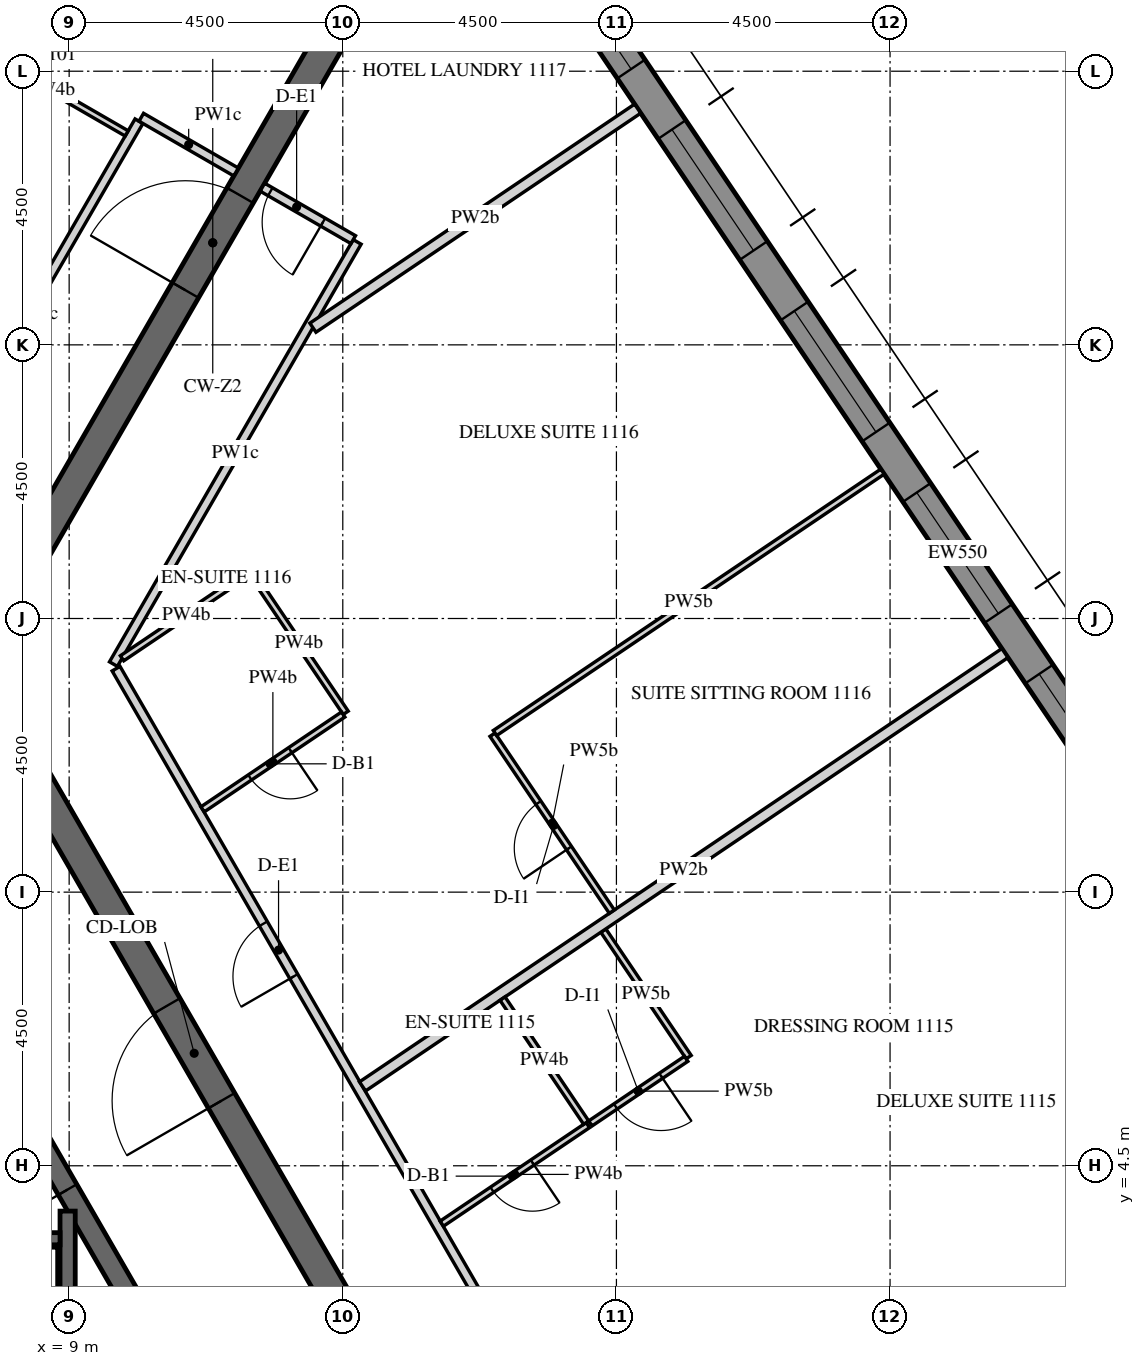
"""IFC4 building model, lengths in metres.
Left out: names, types, materials, properties, quantities, classifications, styles, units other than length and angle.
Written with IfcOpenShell. Run it as: python <this file> out.ifc"""

import sys

from ifc_helpers import new_model, si_unit, direction, frame, frame_2d, origin, place, context, subcontext, project, spatial, polyline, rectangle, outline, extrude, element, fill, save


model = new_model("IFC4")
c1 = context("Model", 3, precision=1e-05, world=origin(), true_north=direction((0.0, 1.0)))
c2 = subcontext(c1, "Body", "Model", "MODEL_VIEW")
j1 = project(units=[si_unit("LENGTHUNIT", "METRE"), si_unit("PLANEANGLEUNIT", "RADIAN")], contexts=[c1])
p1 = place(None, origin())
s1 = spatial("IfcSite", under=j1, at=p1, CompositionType="ELEMENT")
p2 = place(p1, origin())
s2 = spatial("IfcBuilding", under=s1, at=p2, CompositionType="ELEMENT")
p3 = place(p2, frame((0.0, 0.0, 156.6)))
s3 = spatial("IfcBuildingStorey", under=s2, at=p3, CompositionType="ELEMENT", Elevation=156.6)
p4 = place(p3, frame((31.371, 3.071, -0.15), z_axis=(0.0, 0.0, 1.0), x_axis=(-0.559189891278, 0.829039604297, 0.0)))
e1 = element("IfcWall", 1, at=p4, inside=s3, PredefinedType="SOLIDWALL", context=c2, shape_type="SweptSolid", body=[
    extrude(outline(polyline([(-0.026, -0.275), (27.781, -0.275), (27.736, 0.275), (0.026, 0.275), (-0.026, -0.275)])), origin(), (0.0, 0.0, 1.0), 3.9),
])
p5 = place(p4, frame((1.879, 0.0, 1.05)))
e2 = element("IfcOpeningElement", 2, at=p5, cuts=e1, PredefinedType="OPENING", context=c2, shape_type="SweptSolid", body=[
    extrude(rectangle(XDim=2.4, YDim=2.4, at=frame_2d((1.2, 1.2))), frame((0.0, 0.285, 0.0), z_axis=(0.0, -1.0, 0.0), x_axis=(1.0, 0.0, 0.0)), (0.0, 0.0, 1.0), 0.57),
])
p6 = place(p4, frame((5.479, 0.0, 1.05)))
e3 = element("IfcOpeningElement", 3, at=p6, cuts=e1, PredefinedType="OPENING", context=c2, shape_type="SweptSolid", body=[
    extrude(rectangle(XDim=2.4, YDim=2.4, at=frame_2d((1.2, 1.2))), frame((0.0, 0.285, 0.0), z_axis=(0.0, -1.0, 0.0), x_axis=(1.0, 0.0, 0.0)), (0.0, 0.0, 1.0), 0.57),
])
p7 = place(p4, frame((9.079, 0.0, 1.05)))
e4 = element("IfcOpeningElement", 4, at=p7, cuts=e1, PredefinedType="OPENING", context=c2, shape_type="SweptSolid", body=[
    extrude(rectangle(XDim=2.4, YDim=2.4, at=frame_2d((1.2, 1.2))), frame((0.0, 0.285, 0.0), z_axis=(0.0, -1.0, 0.0), x_axis=(1.0, 0.0, 0.0)), (0.0, 0.0, 1.0), 0.57),
])
p8 = place(p4, frame((12.679, 0.0, 1.05)))
e5 = element("IfcOpeningElement", 5, at=p8, cuts=e1, PredefinedType="OPENING", context=c2, shape_type="SweptSolid", body=[
    extrude(rectangle(XDim=2.4, YDim=2.4, at=frame_2d((1.2, 1.2))), frame((0.0, 0.285, 0.0), z_axis=(0.0, -1.0, 0.0), x_axis=(1.0, 0.0, 0.0)), (0.0, 0.0, 1.0), 0.57),
])
p9 = place(p4, frame((16.279, 0.0, 1.05)))
e6 = element("IfcOpeningElement", 6, at=p9, cuts=e1, PredefinedType="OPENING", context=c2, shape_type="SweptSolid", body=[
    extrude(rectangle(XDim=2.4, YDim=2.4, at=frame_2d((1.2, 1.2))), frame((0.0, 0.285, 0.0), z_axis=(0.0, -1.0, 0.0), x_axis=(1.0, 0.0, 0.0)), (0.0, 0.0, 1.0), 0.57),
])
p10 = place(p4, frame((19.879, 0.0, 1.05)))
e7 = element("IfcOpeningElement", 7, at=p10, cuts=e1, PredefinedType="OPENING", context=c2, shape_type="SweptSolid", body=[
    extrude(rectangle(XDim=2.4, YDim=2.4, at=frame_2d((1.2, 1.2))), frame((0.0, 0.285, 0.0), z_axis=(0.0, -1.0, 0.0), x_axis=(1.0, 0.0, 0.0)), (0.0, 0.0, 1.0), 0.57),
])
p11 = place(p4, frame((23.479, 0.0, 1.05)))
e8 = element("IfcOpeningElement", 8, at=p11, cuts=e1, PredefinedType="OPENING", context=c2, shape_type="SweptSolid", body=[
    extrude(rectangle(XDim=2.4, YDim=2.4, at=frame_2d((1.2, 1.2))), frame((0.0, 0.285, 0.0), z_axis=(0.0, -1.0, 0.0), x_axis=(1.0, 0.0, 0.0)), (0.0, 0.0, 1.0), 0.57),
])
p12 = place(p3, frame((14.722, 0.0, -0.15), z_axis=(0.0, 0.0, 1.0), x_axis=(-0.50000571537, 0.866022103989, 0.0)))
e9 = element("IfcWall", 9, at=p12, inside=s3, PredefinedType="SHEAR", context=c2, shape_type="SweptSolid", body=[
    extrude(outline(polyline([(-0.144, -0.25), (14.867, -0.25), (14.578, 0.25), (0.144, 0.25), (-0.144, -0.25)])), origin(), (0.0, 0.0, 1.0), 3.9),
])
p13 = place(p12, frame((6.432, 0.0, 0.15)))
e10 = element("IfcOpeningElement", 10, at=p13, cuts=e9, PredefinedType="OPENING", context=c2, shape_type="SweptSolid", body=[
    extrude(rectangle(XDim=1.8, YDim=2.4, at=frame_2d((0.9, 1.2))), frame((0.0, 0.26, 0.0), z_axis=(0.0, -1.0, 0.0), x_axis=(1.0, 0.0, 0.0)), (0.0, 0.0, 1.0), 0.52),
])
p14 = place(p3, frame((7.506, 13.0, -0.15), z_axis=(0.0, 0.0, 1.0), x_axis=(0.499988271576, 0.866032175087, 0.0)))
e11 = element("IfcWall", 11, at=p14, inside=s3, PredefinedType="SHEAR", context=c2, shape_type="SweptSolid", body=[
    extrude(rectangle(XDim=15.424, YDim=0.5, at=frame_2d((7.712, 0.0))), origin(), (0.0, 0.0, 1.0), 3.9),
])
p15 = place(p14, frame((6.812, 0.0, 0.15)))
e12 = element("IfcOpeningElement", 12, at=p15, cuts=e11, PredefinedType="OPENING", context=c2, shape_type="SweptSolid", body=[
    extrude(rectangle(XDim=1.8, YDim=2.4, at=frame_2d((0.9, 1.2))), frame((0.0, 0.26, 0.0), z_axis=(0.0, -1.0, 0.0), x_axis=(1.0, 0.0, 0.0)), (0.0, 0.0, 1.0), 0.52),
])
p16 = place(p3, frame((11.345, 0.0, -0.15), z_axis=(0.0, 0.0, 1.0), x_axis=(-0.499995046907, 0.866028263435, 0.0)))
e13 = element("IfcWall", 13, at=p16, inside=s3, PredefinedType="SHEAR", context=c2, shape_type="SweptSolid", body=[
    extrude(outline(polyline([(-0.101, -0.175), (11.446, -0.175), (11.244, 0.175), (0.101, 0.175), (-0.101, -0.175)])), origin(), (0.0, 0.0, 1.0), 3.9),
])
p17 = place(p16, frame((4.744, 0.0, 0.15)))
e14 = element("IfcOpeningElement", 14, at=p17, cuts=e13, PredefinedType="OPENING", context=c2, shape_type="SweptSolid", body=[
    extrude(rectangle(XDim=1.8, YDim=2.4, at=frame_2d((0.9, 1.2))), frame((0.0, 0.185, 0.0), z_axis=(0.0, -1.0, 0.0), x_axis=(1.0, 0.0, 0.0)), (0.0, 0.0, 1.0), 0.37),
])
p18 = place(p3, frame((8.975, -3.755, -0.25), z_axis=(0.0, 0.0, 1.0), x_axis=(0.0, 1.0, 0.0)))
e15 = element("IfcWall", 15, at=p18, inside=s3, PredefinedType="SHEAR", context=c2, shape_type="SweptSolid", body=[
    extrude(rectangle(XDim=7.51, YDim=0.25, at=frame_2d((3.755, 0.0))), origin(), (0.0, 0.0, 1.0), 3.9),
])
p19 = place(p3, frame((5.9, 3.3, -0.25), z_axis=(0.0, 0.0, 1.0), x_axis=(1.0, 0.0, 0.0)))
e16 = element("IfcWall", 16, at=p19, inside=s3, PredefinedType="SHEAR", context=c2, shape_type="SweptSolid", body=[
    extrude(rectangle(XDim=2.95, YDim=0.2, at=frame_2d((1.475, 0.0))), origin(), (0.0, 0.0, 1.0), 3.9),
])
p20 = place(p3, frame((10.149, 21.678, 0.0), z_axis=(0.0, 0.0, 1.0), x_axis=(-0.499997422768, -0.866026891745, 0.0)))
e17 = element("IfcWall", 17, at=p20, inside=s3, PredefinedType="PARTITIONING", context=c2, shape_type="SweptSolid", body=[
    extrude(rectangle(XDim=7.942, YDim=0.15, at=frame_2d((3.971, 0.0))), origin(), (0.0, 0.0, 1.0), 2.823),
])
p21 = place(p20, frame((4.833, 0.0, 0.0)))
e18 = element("IfcOpeningElement", 18, at=p21, cuts=e17, PredefinedType="OPENING", context=c2, shape_type="SweptSolid", body=[
    extrude(rectangle(XDim=1.0, YDim=2.1, at=frame_2d((0.5, 1.05))), frame((0.0, 0.085, 0.0), z_axis=(0.0, -1.0, 0.0), x_axis=(1.0, 0.0, 0.0)), (0.0, 0.0, 1.0), 0.17),
])
p22 = place(p3, frame((11.745, 20.843, 0.0), z_axis=(0.0, 0.0, 1.0), x_axis=(-0.865989075817, 0.500062916607, 0.0)))
e19 = element("IfcWall", 19, at=p22, inside=s3, PredefinedType="PARTITIONING", context=c2, shape_type="SweptSolid", body=[
    extrude(rectangle(XDim=1.8, YDim=0.15, at=frame_2d((0.9, 0.0))), origin(), (0.0, 0.0, 1.0), 2.823),
])
p23 = place(p3, frame((17.046, 0.075, 0.0), z_axis=(0.0, 0.0, 1.0), x_axis=(-0.499999403554, 0.866025748143, 0.0)))
e20 = element("IfcWall", 20, at=p23, inside=s3, PredefinedType="PARTITIONING", context=c2, shape_type="SweptSolid", body=[
    extrude(rectangle(XDim=14.549, YDim=0.15, at=frame_2d((7.275, 0.0))), origin(), (0.0, 0.0, 1.0), 2.823),
])
p24 = place(p23, frame((1.781, 0.0, 0.0)))
e21 = element("IfcOpeningElement", 21, at=p24, cuts=e20, PredefinedType="OPENING", context=c2, shape_type="SweptSolid", body=[
    extrude(rectangle(XDim=1.0, YDim=2.1, at=frame_2d((0.5, 1.05))), frame((0.0, 0.085, 0.0), z_axis=(0.0, -1.0, 0.0), x_axis=(1.0, 0.0, 0.0)), (0.0, 0.0, 1.0), 0.17),
])
p25 = place(p23, frame((8.705, 0.0, 0.0)))
e22 = element("IfcOpeningElement", 22, at=p25, cuts=e20, PredefinedType="OPENING", context=c2, shape_type="SweptSolid", body=[
    extrude(rectangle(XDim=1.0, YDim=2.1, at=frame_2d((0.5, 1.05))), frame((0.0, 0.085, 0.0), z_axis=(0.0, -1.0, 0.0), x_axis=(1.0, 0.0, 0.0)), (0.0, 0.0, 1.0), 0.17),
])
p26 = place(p3, frame((9.728, 12.75, 0.0), z_axis=(0.0, 0.0, 1.0), x_axis=(0.500007149838, 0.866021275784, 0.0)))
e23 = element("IfcWall", 23, at=p26, inside=s3, PredefinedType="PARTITIONING", context=c2, shape_type="SweptSolid", body=[
    extrude(rectangle(XDim=8.017, YDim=0.15, at=frame_2d((4.009, 0.0))), origin(), (0.0, 0.0, 1.0), 2.823),
])
p27 = place(p3, frame((13.672, 19.73, 0.0), z_axis=(0.0, 0.0, 1.0), x_axis=(-0.866074815912, 0.499914405916, 0.0)))
e24 = element("IfcWall", 24, at=p27, inside=s3, PredefinedType="PARTITIONING", context=c2, shape_type="SweptSolid", body=[
    extrude(rectangle(XDim=1.725, YDim=0.15, at=frame_2d((0.862, 0.0))), origin(), (0.0, 0.0, 1.0), 2.823),
])
p28 = place(p27, frame((0.575, 0.0, 0.0)))
e25 = element("IfcOpeningElement", 25, at=p28, cuts=e24, PredefinedType="OPENING", context=c2, shape_type="SweptSolid", body=[
    extrude(rectangle(XDim=1.0, YDim=2.1, at=frame_2d((0.5, 1.05))), frame((0.0, 0.085, 0.0), z_axis=(0.0, -1.0, 0.0), x_axis=(1.0, 0.0, 0.0)), (0.0, 0.0, 1.0), 0.17),
])
p29 = place(p3, frame((7.456, 22.915, 0.0), z_axis=(0.0, 0.0, 1.0), x_axis=(0.866018712932, -0.500011588718, 0.0)))
e26 = element("IfcWall", 26, at=p29, inside=s3, PredefinedType="PARTITIONING", context=c2, shape_type="SweptSolid", body=[
    extrude(rectangle(XDim=2.875, YDim=0.1, at=frame_2d((1.438, 0.0))), origin(), (0.0, 0.0, 1.0), 2.823),
])
p30 = place(p3, frame((17.53, 5.168, 0.0), z_axis=(0.0, 0.0, 1.0), x_axis=(-0.829031257997, -0.559202265073, 0.0)))
e27 = element("IfcWall", 27, at=p30, inside=s3, PredefinedType="PARTITIONING", context=c2, shape_type="SweptSolid", body=[
    extrude(rectangle(XDim=2.898, YDim=0.1, at=frame_2d((1.449, 0.0))), origin(), (0.0, 0.0, 1.0), 2.823),
])
p31 = place(p30, frame((1.1, 0.0, 0.0)))
e28 = element("IfcOpeningElement", 28, at=p31, cuts=e27, PredefinedType="OPENING", context=c2, shape_type="SweptSolid", body=[
    extrude(rectangle(XDim=0.8, YDim=2.1, at=frame_2d((0.4, 1.05))), frame((0.0, 0.06, 0.0), z_axis=(0.0, -1.0, 0.0), x_axis=(1.0, 0.0, 0.0)), (0.0, 0.0, 1.0), 0.12),
])
p32 = place(p3, frame((17.785, 8.368, 0.0), z_axis=(0.0, 0.0, 1.0), x_axis=(0.559203861497, -0.829030181168, 0.0)))
e29 = element("IfcWall", 29, at=p32, inside=s3, PredefinedType="PARTITIONING", context=c2, shape_type="SweptSolid", body=[
    extrude(rectangle(XDim=2.51, YDim=0.1, at=frame_2d((1.255, 0.0))), origin(), (0.0, 0.0, 1.0), 2.823),
])
p33 = place(p3, frame((19.147, 6.259, 0.0), z_axis=(0.0, 0.0, 1.0), x_axis=(-0.82903334026, -0.559199178055, 0.0)))
e30 = element("IfcWall", 30, at=p33, inside=s3, PredefinedType="PARTITIONING", context=c2, shape_type="SweptSolid", body=[
    extrude(rectangle(XDim=1.9, YDim=0.1, at=frame_2d((0.95, 0.0))), origin(), (0.0, 0.0, 1.0), 2.823),
])
p34 = place(p33, frame((0.5, 0.0, 0.0)))
e31 = element("IfcOpeningElement", 31, at=p34, cuts=e30, PredefinedType="OPENING", context=c2, shape_type="SweptSolid", body=[
    extrude(rectangle(XDim=0.9, YDim=2.1, at=frame_2d((0.45, 1.05))), frame((0.0, 0.06, 0.0), z_axis=(0.0, -1.0, 0.0), x_axis=(1.0, 0.0, 0.0)), (0.0, 0.0, 1.0), 0.12),
])
p35 = place(p3, frame((24.389, 12.931, 0.0), z_axis=(0.0, 0.0, 1.0), x_axis=(-0.829049407957, -0.559175356365, 0.0)))
e32 = element("IfcWall", 32, at=p35, inside=s3, PredefinedType="PARTITIONING", context=c2, shape_type="SweptSolid", body=[
    extrude(rectangle(XDim=12.743, YDim=0.18, at=frame_2d((6.372, 0.0))), origin(), (0.0, 0.0, 1.0), 2.823),
])
p36 = place(p3, frame((17.502, 5.21, 0.0), z_axis=(0.0, 0.0, 1.0), x_axis=(-0.559203533395, 0.829030402481, 0.0)))
e33 = element("IfcWall", 33, at=p36, inside=s3, PredefinedType="PARTITIONING", context=c2, shape_type="SweptSolid", body=[
    extrude(rectangle(XDim=2.46, YDim=0.1, at=frame_2d((1.23, 0.0))), origin(), (0.0, 0.0, 1.0), 2.823),
])
p37 = place(p3, frame((9.87, 12.846, 0.0), z_axis=(0.0, 0.0, 1.0), x_axis=(0.829045266323, 0.559181496821, 0.0)))
e34 = element("IfcWall", 34, at=p37, inside=s3, PredefinedType="PARTITIONING", context=c2, shape_type="SweptSolid", body=[
    extrude(rectangle(XDim=2.548, YDim=0.1, at=frame_2d((1.274, 0.0))), origin(), (0.0, 0.0, 1.0), 2.823),
])
p38 = place(p3, frame((12.01, 14.229, 0.0), z_axis=(0.0, 0.0, 1.0), x_axis=(0.559158698756, -0.8290606429, 0.0)))
e35 = element("IfcWall", 35, at=p38, inside=s3, PredefinedType="PARTITIONING", context=c2, shape_type="SweptSolid", body=[
    extrude(rectangle(XDim=2.75, YDim=0.1, at=frame_2d((1.375, 0.0))), origin(), (0.0, 0.0, 1.0), 2.823),
])
p39 = place(p3, frame((13.506, 11.921, 0.0), z_axis=(0.0, 0.0, 1.0), x_axis=(-0.829048535811, -0.559176649431, 0.0)))
e36 = element("IfcWall", 36, at=p39, inside=s3, PredefinedType="PARTITIONING", context=c2, shape_type="SweptSolid", body=[
    extrude(rectangle(XDim=2.789, YDim=0.1, at=frame_2d((1.395, 0.0))), origin(), (0.0, 0.0, 1.0), 2.823),
])
p40 = place(p39, frame((1.05, 0.0, 0.0)))
e37 = element("IfcOpeningElement", 37, at=p40, cuts=e36, PredefinedType="OPENING", context=c2, shape_type="SweptSolid", body=[
    extrude(rectangle(XDim=0.8, YDim=2.1, at=frame_2d((0.4, 1.05))), frame((0.0, 0.06, 0.0), z_axis=(0.0, -1.0, 0.0), x_axis=(1.0, 0.0, 0.0)), (0.0, 0.0, 1.0), 0.12),
])
p41 = place(p3, frame((17.925, 8.679, 0.0), z_axis=(0.0, 0.0, 1.0), x_axis=(-0.559170576854, 0.829052631611, 0.0)))
e38 = element("IfcWall", 38, at=p41, inside=s3, PredefinedType="PARTITIONING", context=c2, shape_type="SweptSolid", body=[
    extrude(rectangle(XDim=3.51, YDim=0.1, at=frame_2d((1.755, 0.0))), origin(), (0.0, 0.0, 1.0), 2.823),
])
p42 = place(p41, frame((1.26, 0.0, 0.0)))
e39 = element("IfcOpeningElement", 39, at=p42, cuts=e38, PredefinedType="OPENING", context=c2, shape_type="SweptSolid", body=[
    extrude(rectangle(XDim=0.9, YDim=2.1, at=frame_2d((0.45, 1.05))), frame((0.0, 0.06, 0.0), z_axis=(0.0, -1.0, 0.0), x_axis=(1.0, 0.0, 0.0)), (0.0, 0.0, 1.0), 0.12),
])
p43 = place(p3, frame((16.003, 11.617, 0.0), z_axis=(0.0, 0.0, 1.0), x_axis=(0.829037886281, 0.559192438352, 0.0)))
e40 = element("IfcWall", 40, at=p43, inside=s3, PredefinedType="PARTITIONING", context=c2, shape_type="SweptSolid", body=[
    extrude(rectangle(XDim=7.687, YDim=0.1, at=frame_2d((3.843, 0.0))), origin(), (0.0, 0.0, 1.0), 2.823),
])
p44 = place(p3, frame((18.35, 21.884, 0.0), z_axis=(0.0, 0.0, 1.0), x_axis=(-0.829047205772, -0.559178621374, 0.0)))
e41 = element("IfcWall", 41, at=p44, inside=s3, PredefinedType="PARTITIONING", context=c2, shape_type="SweptSolid", body=[
    extrude(rectangle(XDim=6.442, YDim=0.18, at=frame_2d((3.221, 0.0))), origin(), (0.0, 0.0, 1.0), 2.823),
])
p45 = place(p7, frame((0.0, 0.205, 0.0)))
e42 = element("IfcWindow", 42, at=p45, inside=s3, PartitioningType="DOUBLE_PANEL_VERTICAL", PredefinedType="WINDOW", context=c2, shape_type="SweptSolid", body=[
    extrude(rectangle(XDim=2.4, YDim=2.4, at=frame_2d((1.2, 1.2))), frame((0.0, 0.03, 0.0), z_axis=(0.0, -1.0, 0.0), x_axis=(1.0, 0.0, 0.0)), (0.0, 0.0, 1.0), 0.06),
])
fill(e4, e42)
p46 = place(p8, frame((0.0, 0.205, 0.0)))
e43 = element("IfcWindow", 43, at=p46, inside=s3, PartitioningType="DOUBLE_PANEL_VERTICAL", PredefinedType="WINDOW", context=c2, shape_type="SweptSolid", body=[
    extrude(rectangle(XDim=2.4, YDim=2.4, at=frame_2d((1.2, 1.2))), frame((0.0, 0.03, 0.0), z_axis=(0.0, -1.0, 0.0), x_axis=(1.0, 0.0, 0.0)), (0.0, 0.0, 1.0), 0.06),
])
fill(e5, e43)
p47 = place(p9, frame((0.0, 0.205, 0.0)))
e44 = element("IfcWindow", 44, at=p47, inside=s3, PartitioningType="DOUBLE_PANEL_VERTICAL", PredefinedType="WINDOW", context=c2, shape_type="SweptSolid", body=[
    extrude(rectangle(XDim=2.4, YDim=2.4, at=frame_2d((1.2, 1.2))), frame((0.0, 0.03, 0.0), z_axis=(0.0, -1.0, 0.0), x_axis=(1.0, 0.0, 0.0)), (0.0, 0.0, 1.0), 0.06),
])
fill(e6, e44)
p48 = place(p10, frame((0.0, 0.205, 0.0)))
e45 = element("IfcWindow", 45, at=p48, inside=s3, PartitioningType="DOUBLE_PANEL_VERTICAL", PredefinedType="WINDOW", context=c2, shape_type="SweptSolid", body=[
    extrude(rectangle(XDim=2.4, YDim=2.4, at=frame_2d((1.2, 1.2))), frame((0.0, 0.03, 0.0), z_axis=(0.0, -1.0, 0.0), x_axis=(1.0, 0.0, 0.0)), (0.0, 0.0, 1.0), 0.06),
])
fill(e7, e45)
p49 = place(p11, frame((0.0, 0.205, 0.0)))
e46 = element("IfcWindow", 46, at=p49, inside=s3, PartitioningType="DOUBLE_PANEL_VERTICAL", PredefinedType="WINDOW", context=c2, shape_type="SweptSolid", body=[
    extrude(rectangle(XDim=2.4, YDim=2.4, at=frame_2d((1.2, 1.2))), frame((0.0, 0.03, 0.0), z_axis=(0.0, -1.0, 0.0), x_axis=(1.0, 0.0, 0.0)), (0.0, 0.0, 1.0), 0.06),
])
fill(e8, e46)
p50 = place(p13, origin())
e47 = element("IfcDoor", 47, at=p50, inside=s3, OperationType="DOUBLE_DOOR_SINGLE_SWING", PredefinedType="DOOR", context=c2, shape_type="SweptSolid", body=[
    extrude(rectangle(XDim=1.8, YDim=2.4, at=frame_2d((0.9, 1.2))), frame((0.0, 0.025, 0.0), z_axis=(0.0, -1.0, 0.0), x_axis=(1.0, 0.0, 0.0)), (0.0, 0.0, 1.0), 0.05),
])
fill(e10, e47)
p51 = place(p15, origin())
e48 = element("IfcDoor", 48, at=p51, inside=s3, OperationType="DOUBLE_DOOR_SINGLE_SWING", PredefinedType="DOOR", context=c2, shape_type="SweptSolid", body=[
    extrude(rectangle(XDim=1.8, YDim=2.4, at=frame_2d((0.9, 1.2))), frame((0.0, 0.025, 0.0), z_axis=(0.0, -1.0, 0.0), x_axis=(1.0, 0.0, 0.0)), (0.0, 0.0, 1.0), 0.05),
])
fill(e12, e48)
p52 = place(p17, origin())
e49 = element("IfcDoor", 49, at=p52, inside=s3, OperationType="DOUBLE_DOOR_SINGLE_SWING", PredefinedType="DOOR", context=c2, shape_type="SweptSolid", body=[
    extrude(rectangle(XDim=1.8, YDim=2.4, at=frame_2d((0.9, 1.2))), frame((0.0, 0.025, 0.0), z_axis=(0.0, -1.0, 0.0), x_axis=(1.0, 0.0, 0.0)), (0.0, 0.0, 1.0), 0.05),
])
fill(e14, e49)
p53 = place(p31, origin())
e50 = element("IfcDoor", 50, at=p53, inside=s3, OperationType="SINGLE_SWING_LEFT", PredefinedType="DOOR", context=c2, shape_type="SweptSolid", body=[
    extrude(rectangle(XDim=0.8, YDim=2.1, at=frame_2d((0.4, 1.05))), frame((0.0, 0.025, 0.0), z_axis=(0.0, -1.0, 0.0), x_axis=(1.0, 0.0, 0.0)), (0.0, 0.0, 1.0), 0.05),
])
fill(e28, e50)
p54 = place(p34, origin())
e51 = element("IfcDoor", 51, at=p54, inside=s3, OperationType="SINGLE_SWING_RIGHT", PredefinedType="DOOR", context=c2, shape_type="SweptSolid", body=[
    extrude(rectangle(XDim=0.9, YDim=2.1, at=frame_2d((0.45, 1.05))), frame((0.0, 0.025, 0.0), z_axis=(0.0, -1.0, 0.0), x_axis=(1.0, 0.0, 0.0)), (0.0, 0.0, 1.0), 0.05),
])
fill(e31, e51)
p55 = place(p25, origin())
e52 = element("IfcDoor", 52, at=p55, inside=s3, OperationType="SINGLE_SWING_RIGHT", PredefinedType="DOOR", context=c2, shape_type="SweptSolid", body=[
    extrude(rectangle(XDim=1.0, YDim=2.1, at=frame_2d((0.5, 1.05))), frame((0.0, 0.025, 0.0), z_axis=(0.0, -1.0, 0.0), x_axis=(1.0, 0.0, 0.0)), (0.0, 0.0, 1.0), 0.05),
])
fill(e22, e52)
p56 = place(p40, origin())
e53 = element("IfcDoor", 53, at=p56, inside=s3, OperationType="SINGLE_SWING_LEFT", PredefinedType="DOOR", context=c2, shape_type="SweptSolid", body=[
    extrude(rectangle(XDim=0.8, YDim=2.1, at=frame_2d((0.4, 1.05))), frame((0.0, 0.025, 0.0), z_axis=(0.0, -1.0, 0.0), x_axis=(1.0, 0.0, 0.0)), (0.0, 0.0, 1.0), 0.05),
])
fill(e37, e53)
p57 = place(p42, origin())
e54 = element("IfcDoor", 54, at=p57, inside=s3, OperationType="SINGLE_SWING_RIGHT", PredefinedType="DOOR", context=c2, shape_type="SweptSolid", body=[
    extrude(rectangle(XDim=0.9, YDim=2.1, at=frame_2d((0.45, 1.05))), frame((0.0, 0.025, 0.0), z_axis=(0.0, -1.0, 0.0), x_axis=(1.0, 0.0, 0.0)), (0.0, 0.0, 1.0), 0.05),
])
fill(e39, e54)
p58 = place(p28, origin())
e55 = element("IfcDoor", 55, at=p58, inside=s3, OperationType="SINGLE_SWING_LEFT", PredefinedType="DOOR", context=c2, shape_type="SweptSolid", body=[
    extrude(rectangle(XDim=1.0, YDim=2.1, at=frame_2d((0.5, 1.05))), frame((0.0, 0.025, 0.0), z_axis=(0.0, -1.0, 0.0), x_axis=(1.0, 0.0, 0.0)), (0.0, 0.0, 1.0), 0.05),
])
fill(e25, e55)
save(model, sys.argv[1])
